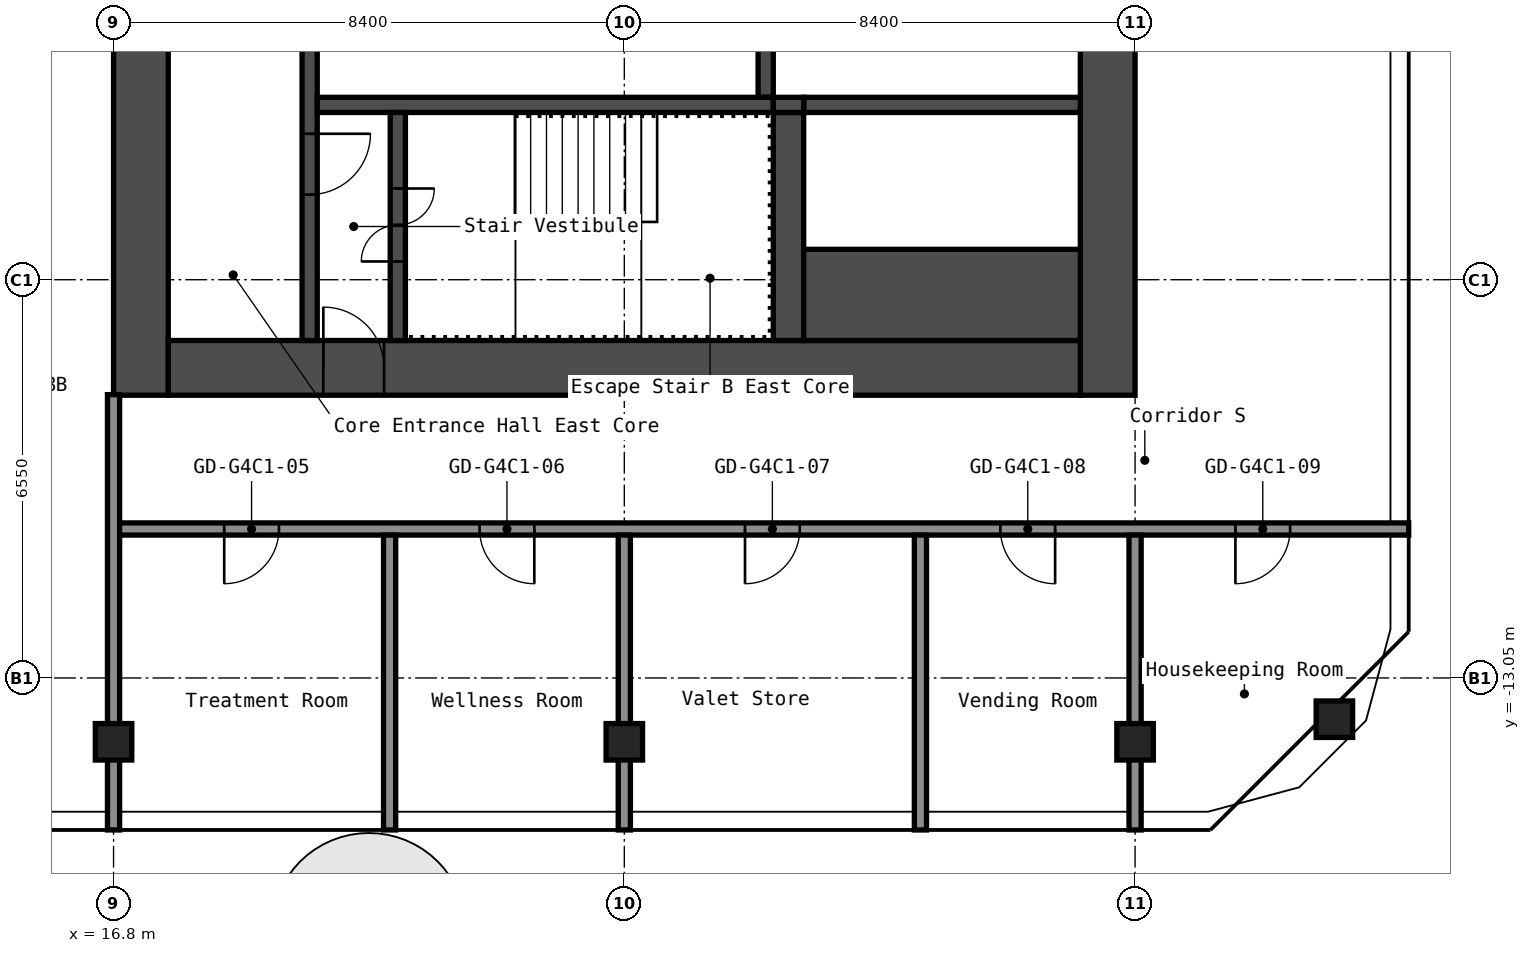
"""IFC4 building model, lengths in metres.
Left out: names, types, materials, properties, quantities, classifications, styles, units other than length and angle.
Written with IfcOpenShell. Run it as: python <this file> out.ifc"""

import sys

from ifc_helpers import new_model, si_unit, direction, frame, frame_2d, origin, origin_2d, place, context, subcontext, project, spatial, rectangle, hollow_rectangle, extrude, element, fill, save


model = new_model("IFC4")
c1 = context("Model", 3, precision=1e-05, world=origin(), true_north=direction((0.0, 1.0)))
c2 = subcontext(c1, "Body", "Model", "MODEL_VIEW")
j1 = project(units=[si_unit("LENGTHUNIT", "METRE"), si_unit("PLANEANGLEUNIT", "RADIAN")], contexts=[c1])
p1 = place(None, origin())
s1 = spatial("IfcSite", under=j1, at=p1, CompositionType="ELEMENT")
p2 = place(p1, origin())
s2 = spatial("IfcBuilding", under=s1, at=p2, CompositionType="ELEMENT")
p3 = place(p2, frame((0.0, 0.0, 209.0)))
s3 = spatial("IfcBuildingStorey", under=s2, at=p3, CompositionType="ELEMENT", Elevation=209.0)
for number, where, z_axis, x_axis in (
    (1, (16.8, -14.1, 0.0), (0.0, 0.0, 1.0), (1.0, 0.0, 0.0)),
    (2, (25.2, -14.1, 0.0), (0.0, 0.0, 1.0), (1.0, 0.0, 0.0)),
    (3, (33.6, -14.1, 0.0), (0.0, 0.0, 1.0), (1.0, 0.0, 0.0)),
    (4, (36.878, -13.729, 0.0), (0.0, 0.0, 1.0), (1.0, 0.0, 0.0)),
):
    element("IfcColumn", number, at=place(p3, frame(where, z_axis=z_axis, x_axis=x_axis)), inside=s3, PredefinedType="COLUMN", context=c2, shape_type="SweptSolid", body=[
        extrude(hollow_rectangle(XDim=0.6, YDim=0.6, WallThickness=0.025, InnerFilletRadius=0.038, OuterFilletRadius=0.062, at=origin_2d()), origin(), (0.0, 0.0, 1.0), 2.75),
    ])
p4 = place(p3, frame((17.25, -8.4, 0.0), z_axis=(0.0, 0.0, 1.0), x_axis=(0.0, 1.0, 0.0)))
e5 = element("IfcWall", 5, at=p4, inside=s3, PredefinedType="SHEAR", context=c2, shape_type="SweptSolid", body=[
    extrude(rectangle(XDim=16.8, YDim=0.9, at=frame_2d((8.4, 0.0))), origin(), (0.0, 0.0, 1.0), 2.75),
])
p5 = place(p4, frame((10.1, 0.0, 0.0)))
e6 = element("IfcOpeningElement", 6, at=p5, cuts=e5, PredefinedType="OPENING", context=c2, shape_type="SweptSolid", body=[
    extrude(rectangle(XDim=1.6, YDim=2.1, at=frame_2d((0.8, 1.05))), frame((0.0, 0.46, 0.0), z_axis=(0.0, -1.0, 0.0), x_axis=(1.0, 0.0, 0.0)), (0.0, 0.0, 1.0), 0.92),
])
p6 = place(p3, frame((33.15, -8.4, 0.0), z_axis=(0.0, 0.0, 1.0), x_axis=(0.0, 1.0, 0.0)))
e7 = element("IfcWall", 7, at=p6, inside=s3, PredefinedType="SHEAR", context=c2, shape_type="SweptSolid", body=[
    extrude(rectangle(XDim=16.8, YDim=0.9, at=frame_2d((8.4, 0.0))), origin(), (0.0, 0.0, 1.0), 2.75),
])
p7 = place(p3, frame((17.7, -7.95, 0.0), z_axis=(0.0, 0.0, 1.0), x_axis=(1.0, 0.0, 0.0)))
e8 = element("IfcWall", 8, at=p7, inside=s3, PredefinedType="SHEAR", context=c2, shape_type="SweptSolid", body=[
    extrude(rectangle(XDim=15.0, YDim=0.9, at=frame_2d((7.5, 0.0))), origin(), (0.0, 0.0, 1.0), 2.75),
])
p8 = place(p7, frame((2.55, 0.0, 0.0)))
e9 = element("IfcOpeningElement", 9, at=p8, cuts=e8, PredefinedType="OPENING", context=c2, shape_type="SweptSolid", body=[
    extrude(rectangle(XDim=1.0, YDim=2.1, at=frame_2d((0.5, 1.05))), frame((0.0, 0.46, 0.0), z_axis=(0.0, -1.0, 0.0), x_axis=(1.0, 0.0, 0.0)), (0.0, 0.0, 1.0), 0.92),
])
p9 = place(p3, frame((20.025, -7.5, 0.0), z_axis=(0.0, 0.0, 1.0), x_axis=(0.0, 1.0, 0.0)))
e10 = element("IfcWall", 10, at=p9, inside=s3, PredefinedType="SHEAR", context=c2, shape_type="SweptSolid", body=[
    extrude(rectangle(XDim=6.3, YDim=0.25, at=frame_2d((3.15, 0.0))), origin(), (0.0, 0.0, 1.0), 2.75),
])
p10 = place(p9, frame((2.4, 0.0, 0.0)))
e11 = element("IfcOpeningElement", 11, at=p10, cuts=e10, PredefinedType="OPENING", context=c2, shape_type="SweptSolid", body=[
    extrude(rectangle(XDim=1.0, YDim=2.1, at=frame_2d((0.5, 1.05))), frame((0.0, 0.135, 0.0), z_axis=(0.0, -1.0, 0.0), x_axis=(1.0, 0.0, 0.0)), (0.0, 0.0, 1.0), 0.27),
])
p11 = place(p3, frame((27.525, -3.5, 0.0), z_axis=(0.0, 0.0, 1.0), x_axis=(0.0, 1.0, 0.0)))
e12 = element("IfcWall", 12, at=p11, inside=s3, PredefinedType="SHEAR", context=c2, shape_type="SweptSolid", body=[
    extrude(rectangle(XDim=2.05, YDim=0.25, at=frame_2d((1.025, 0.0))), origin(), (0.0, 0.0, 1.0), 2.75),
])
p12 = place(p3, frame((20.15, -3.625, 0.0), z_axis=(0.0, 0.0, 1.0), x_axis=(1.0, 0.0, 0.0)))
e13 = element("IfcWall", 13, at=p12, inside=s3, PredefinedType="SHEAR", context=c2, shape_type="SweptSolid", body=[
    extrude(rectangle(XDim=7.5, YDim=0.25, at=frame_2d((3.75, 0.0))), origin(), (0.0, 0.0, 1.0), 2.75),
])
p13 = place(p3, frame((21.475, -7.5, 0.0), z_axis=(0.0, 0.0, 1.0), x_axis=(0.0, 1.0, 0.0)))
e14 = element("IfcWall", 14, at=p13, inside=s3, PredefinedType="SHEAR", context=c2, shape_type="SweptSolid", body=[
    extrude(rectangle(XDim=3.75, YDim=0.25, at=frame_2d((1.875, 0.0))), origin(), (0.0, 0.0, 1.0), 2.75),
])
p14 = place(p13, frame((1.3, 0.0, 0.0)))
e15 = element("IfcOpeningElement", 15, at=p14, cuts=e14, PredefinedType="OPENING", context=c2, shape_type="SweptSolid", body=[
    extrude(rectangle(XDim=1.2, YDim=2.1, at=frame_2d((0.6, 1.05))), frame((0.0, 0.135, 0.0), z_axis=(0.0, -1.0, 0.0), x_axis=(1.0, 0.0, 0.0)), (0.0, 0.0, 1.0), 0.27),
])
p15 = place(p3, frame((27.9, -7.5, 0.0), z_axis=(0.0, 0.0, 1.0), x_axis=(0.0, 1.0, 0.0)))
e16 = element("IfcWall", 16, at=p15, inside=s3, PredefinedType="SHEAR", context=c2, shape_type="SweptSolid", body=[
    extrude(rectangle(XDim=3.75, YDim=0.5, at=frame_2d((1.875, 0.0))), origin(), (0.0, 0.0, 1.0), 2.75),
])
p16 = place(p3, frame((28.15, -3.625, 0.0), z_axis=(0.0, 0.0, 1.0), x_axis=(1.0, 0.0, 0.0)))
e17 = element("IfcWall", 17, at=p16, inside=s3, PredefinedType="SHEAR", context=c2, shape_type="SweptSolid", body=[
    extrude(rectangle(XDim=4.55, YDim=0.25, at=frame_2d((2.275, 0.0))), origin(), (0.0, 0.0, 1.0), 2.75),
])
p17 = place(p3, frame((28.15, -6.75, 0.0), z_axis=(0.0, 0.0, 1.0), x_axis=(1.0, 0.0, 0.0)))
e18 = element("IfcWall", 18, at=p17, inside=s3, PredefinedType="SHEAR", context=c2, shape_type="SweptSolid", body=[
    extrude(rectangle(XDim=4.55, YDim=1.5, at=frame_2d((2.275, 0.0))), origin(), (0.0, 0.0, 1.0), 2.75),
])
p18 = place(p3, frame((27.65, -3.625, 0.0), z_axis=(0.0, 0.0, 1.0), x_axis=(1.0, 0.0, 0.0)))
e19 = element("IfcWall", 19, at=p18, inside=s3, PredefinedType="SHEAR", context=c2, shape_type="SweptSolid", body=[
    extrude(rectangle(XDim=0.5, YDim=0.25, at=frame_2d((0.25, 0.0))), origin(), (0.0, 0.0, 1.0), 2.75),
])
p19 = place(p3, frame((16.8, -10.6, 0.0), z_axis=(0.0, 0.0, 1.0), x_axis=(1.0, 0.0, 0.0)))
e20 = element("IfcWall", 20, at=p19, inside=s3, PredefinedType="PARTITIONING", context=c2, shape_type="SweptSolid", body=[
    extrude(rectangle(XDim=21.3, YDim=0.2, at=frame_2d((10.65, 0.0))), origin(), (0.0, 0.0, 1.0), 2.75),
])
p20 = place(p19, frame((1.82, 0.0, 0.0)))
e21 = element("IfcOpeningElement", 21, at=p20, cuts=e20, PredefinedType="OPENING", context=c2, shape_type="SweptSolid", body=[
    extrude(rectangle(XDim=0.9, YDim=2.1, at=frame_2d((0.45, 1.05))), frame((0.0, 0.11, 0.0), z_axis=(0.0, -1.0, 0.0), x_axis=(1.0, 0.0, 0.0)), (0.0, 0.0, 1.0), 0.22),
])
p21 = place(p19, frame((6.02, 0.0, 0.0)))
e22 = element("IfcOpeningElement", 22, at=p21, cuts=e20, PredefinedType="OPENING", context=c2, shape_type="SweptSolid", body=[
    extrude(rectangle(XDim=0.9, YDim=2.1, at=frame_2d((0.45, 1.05))), frame((0.0, 0.11, 0.0), z_axis=(0.0, -1.0, 0.0), x_axis=(1.0, 0.0, 0.0)), (0.0, 0.0, 1.0), 0.22),
])
p22 = place(p19, frame((10.385, 0.0, 0.0)))
e23 = element("IfcOpeningElement", 23, at=p22, cuts=e20, PredefinedType="OPENING", context=c2, shape_type="SweptSolid", body=[
    extrude(rectangle(XDim=0.9, YDim=2.1, at=frame_2d((0.45, 1.05))), frame((0.0, 0.11, 0.0), z_axis=(0.0, -1.0, 0.0), x_axis=(1.0, 0.0, 0.0)), (0.0, 0.0, 1.0), 0.22),
])
p23 = place(p19, frame((14.585, 0.0, 0.0)))
e24 = element("IfcOpeningElement", 24, at=p23, cuts=e20, PredefinedType="OPENING", context=c2, shape_type="SweptSolid", body=[
    extrude(rectangle(XDim=0.9, YDim=2.1, at=frame_2d((0.45, 1.05))), frame((0.0, 0.11, 0.0), z_axis=(0.0, -1.0, 0.0), x_axis=(1.0, 0.0, 0.0)), (0.0, 0.0, 1.0), 0.22),
])
p24 = place(p19, frame((18.45, 0.0, 0.0)))
e25 = element("IfcOpeningElement", 25, at=p24, cuts=e20, PredefinedType="OPENING", context=c2, shape_type="SweptSolid", body=[
    extrude(rectangle(XDim=0.9, YDim=2.1, at=frame_2d((0.45, 1.05))), frame((0.0, 0.11, 0.0), z_axis=(0.0, -1.0, 0.0), x_axis=(1.0, 0.0, 0.0)), (0.0, 0.0, 1.0), 0.22),
])
p25 = place(p3, frame((16.8, -15.55, 0.0), z_axis=(0.0, 0.0, 1.0), x_axis=(0.0, 1.0, 0.0)))
e26 = element("IfcWall", 26, at=p25, inside=s3, PredefinedType="PARTITIONING", context=c2, shape_type="SweptSolid", body=[
    extrude(rectangle(XDim=7.16, YDim=0.2, at=frame_2d((3.58, 0.0))), origin(), (0.0, 0.0, 1.0), 2.75),
])
for number, where, z_axis, x_axis in (
    (27, (21.34, -15.55, 0.0), (0.0, 0.0, 1.0), (0.0, 1.0, 0.0)),
    (28, (25.2, -15.55, 0.0), (0.0, 0.0, 1.0), (0.0, 1.0, 0.0)),
    (29, (30.07, -15.55, 0.0), (0.0, 0.0, 1.0), (0.0, 1.0, 0.0)),
    (30, (33.6, -15.55, 0.0), (0.0, 0.0, 1.0), (0.0, 1.0, 0.0)),
):
    element("IfcWall", number, at=place(p3, frame(where, z_axis=z_axis, x_axis=x_axis)), inside=s3, PredefinedType="PARTITIONING", context=c2, shape_type="SweptSolid", body=[
        extrude(rectangle(XDim=4.85, YDim=0.2, at=frame_2d((2.425, 0.0))), origin(), (0.0, 0.0, 1.0), 2.75),
    ])
p26 = place(p8, origin())
e31 = element("IfcDoor", 31, at=p26, inside=s3, OperationType="SINGLE_SWING_RIGHT", PredefinedType="DOOR", context=c2, shape_type="SweptSolid", body=[
    extrude(rectangle(XDim=1.0, YDim=2.1, at=frame_2d((0.5, 1.05))), frame((0.0, 0.025, 0.0), z_axis=(0.0, -1.0, 0.0), x_axis=(1.0, 0.0, 0.0)), (0.0, 0.0, 1.0), 0.05),
])
fill(e9, e31)
p27 = place(p14, origin())
e32 = element("IfcDoor", 32, at=p27, inside=s3, OperationType="DOUBLE_DOOR_SINGLE_SWING", PredefinedType="DOOR", context=c2, shape_type="SweptSolid", body=[
    extrude(rectangle(XDim=1.2, YDim=2.1, at=frame_2d((0.6, 1.05))), frame((0.0, 0.025, 0.0), z_axis=(0.0, -1.0, 0.0), x_axis=(1.0, 0.0, 0.0)), (0.0, 0.0, 1.0), 0.05),
])
fill(e15, e32)
p28 = place(p10, origin())
e33 = element("IfcDoor", 33, at=p28, inside=s3, OperationType="SINGLE_SWING_RIGHT", PredefinedType="DOOR", context=c2, shape_type="SweptSolid", body=[
    extrude(rectangle(XDim=1.0, YDim=2.1, at=frame_2d((0.5, 1.05))), frame((0.0, 0.025, 0.0), z_axis=(0.0, -1.0, 0.0), x_axis=(1.0, 0.0, 0.0)), (0.0, 0.0, 1.0), 0.05),
])
fill(e11, e33)
p29 = place(p20, origin())
e34 = element("IfcDoor", 34, at=p29, inside=s3, OperationType="SINGLE_SWING_LEFT", PredefinedType="DOOR", context=c2, shape_type="SweptSolid", body=[
    extrude(rectangle(XDim=0.9, YDim=2.1, at=frame_2d((0.45, 1.05))), frame((0.0, 0.025, 0.0), z_axis=(0.0, -1.0, 0.0), x_axis=(1.0, 0.0, 0.0)), (0.0, 0.0, 1.0), 0.05),
])
fill(e21, e34)
p30 = place(p21, origin())
e35 = element("IfcDoor", 35, at=p30, inside=s3, OperationType="SINGLE_SWING_RIGHT", PredefinedType="DOOR", context=c2, shape_type="SweptSolid", body=[
    extrude(rectangle(XDim=0.9, YDim=2.1, at=frame_2d((0.45, 1.05))), frame((0.0, 0.025, 0.0), z_axis=(0.0, -1.0, 0.0), x_axis=(1.0, 0.0, 0.0)), (0.0, 0.0, 1.0), 0.05),
])
fill(e22, e35)
p31 = place(p22, origin())
e36 = element("IfcDoor", 36, at=p31, inside=s3, OperationType="SINGLE_SWING_LEFT", PredefinedType="DOOR", context=c2, shape_type="SweptSolid", body=[
    extrude(rectangle(XDim=0.9, YDim=2.1, at=frame_2d((0.45, 1.05))), frame((0.0, 0.025, 0.0), z_axis=(0.0, -1.0, 0.0), x_axis=(1.0, 0.0, 0.0)), (0.0, 0.0, 1.0), 0.05),
])
fill(e23, e36)
p32 = place(p23, origin())
e37 = element("IfcDoor", 37, at=p32, inside=s3, OperationType="SINGLE_SWING_RIGHT", PredefinedType="DOOR", context=c2, shape_type="SweptSolid", body=[
    extrude(rectangle(XDim=0.9, YDim=2.1, at=frame_2d((0.45, 1.05))), frame((0.0, 0.025, 0.0), z_axis=(0.0, -1.0, 0.0), x_axis=(1.0, 0.0, 0.0)), (0.0, 0.0, 1.0), 0.05),
])
fill(e24, e37)
p33 = place(p24, origin())
e38 = element("IfcDoor", 38, at=p33, inside=s3, OperationType="SINGLE_SWING_LEFT", PredefinedType="DOOR", context=c2, shape_type="SweptSolid", body=[
    extrude(rectangle(XDim=0.9, YDim=2.1, at=frame_2d((0.45, 1.05))), frame((0.0, 0.025, 0.0), z_axis=(0.0, -1.0, 0.0), x_axis=(1.0, 0.0, 0.0)), (0.0, 0.0, 1.0), 0.05),
])
fill(e25, e38)
save(model, sys.argv[1])
